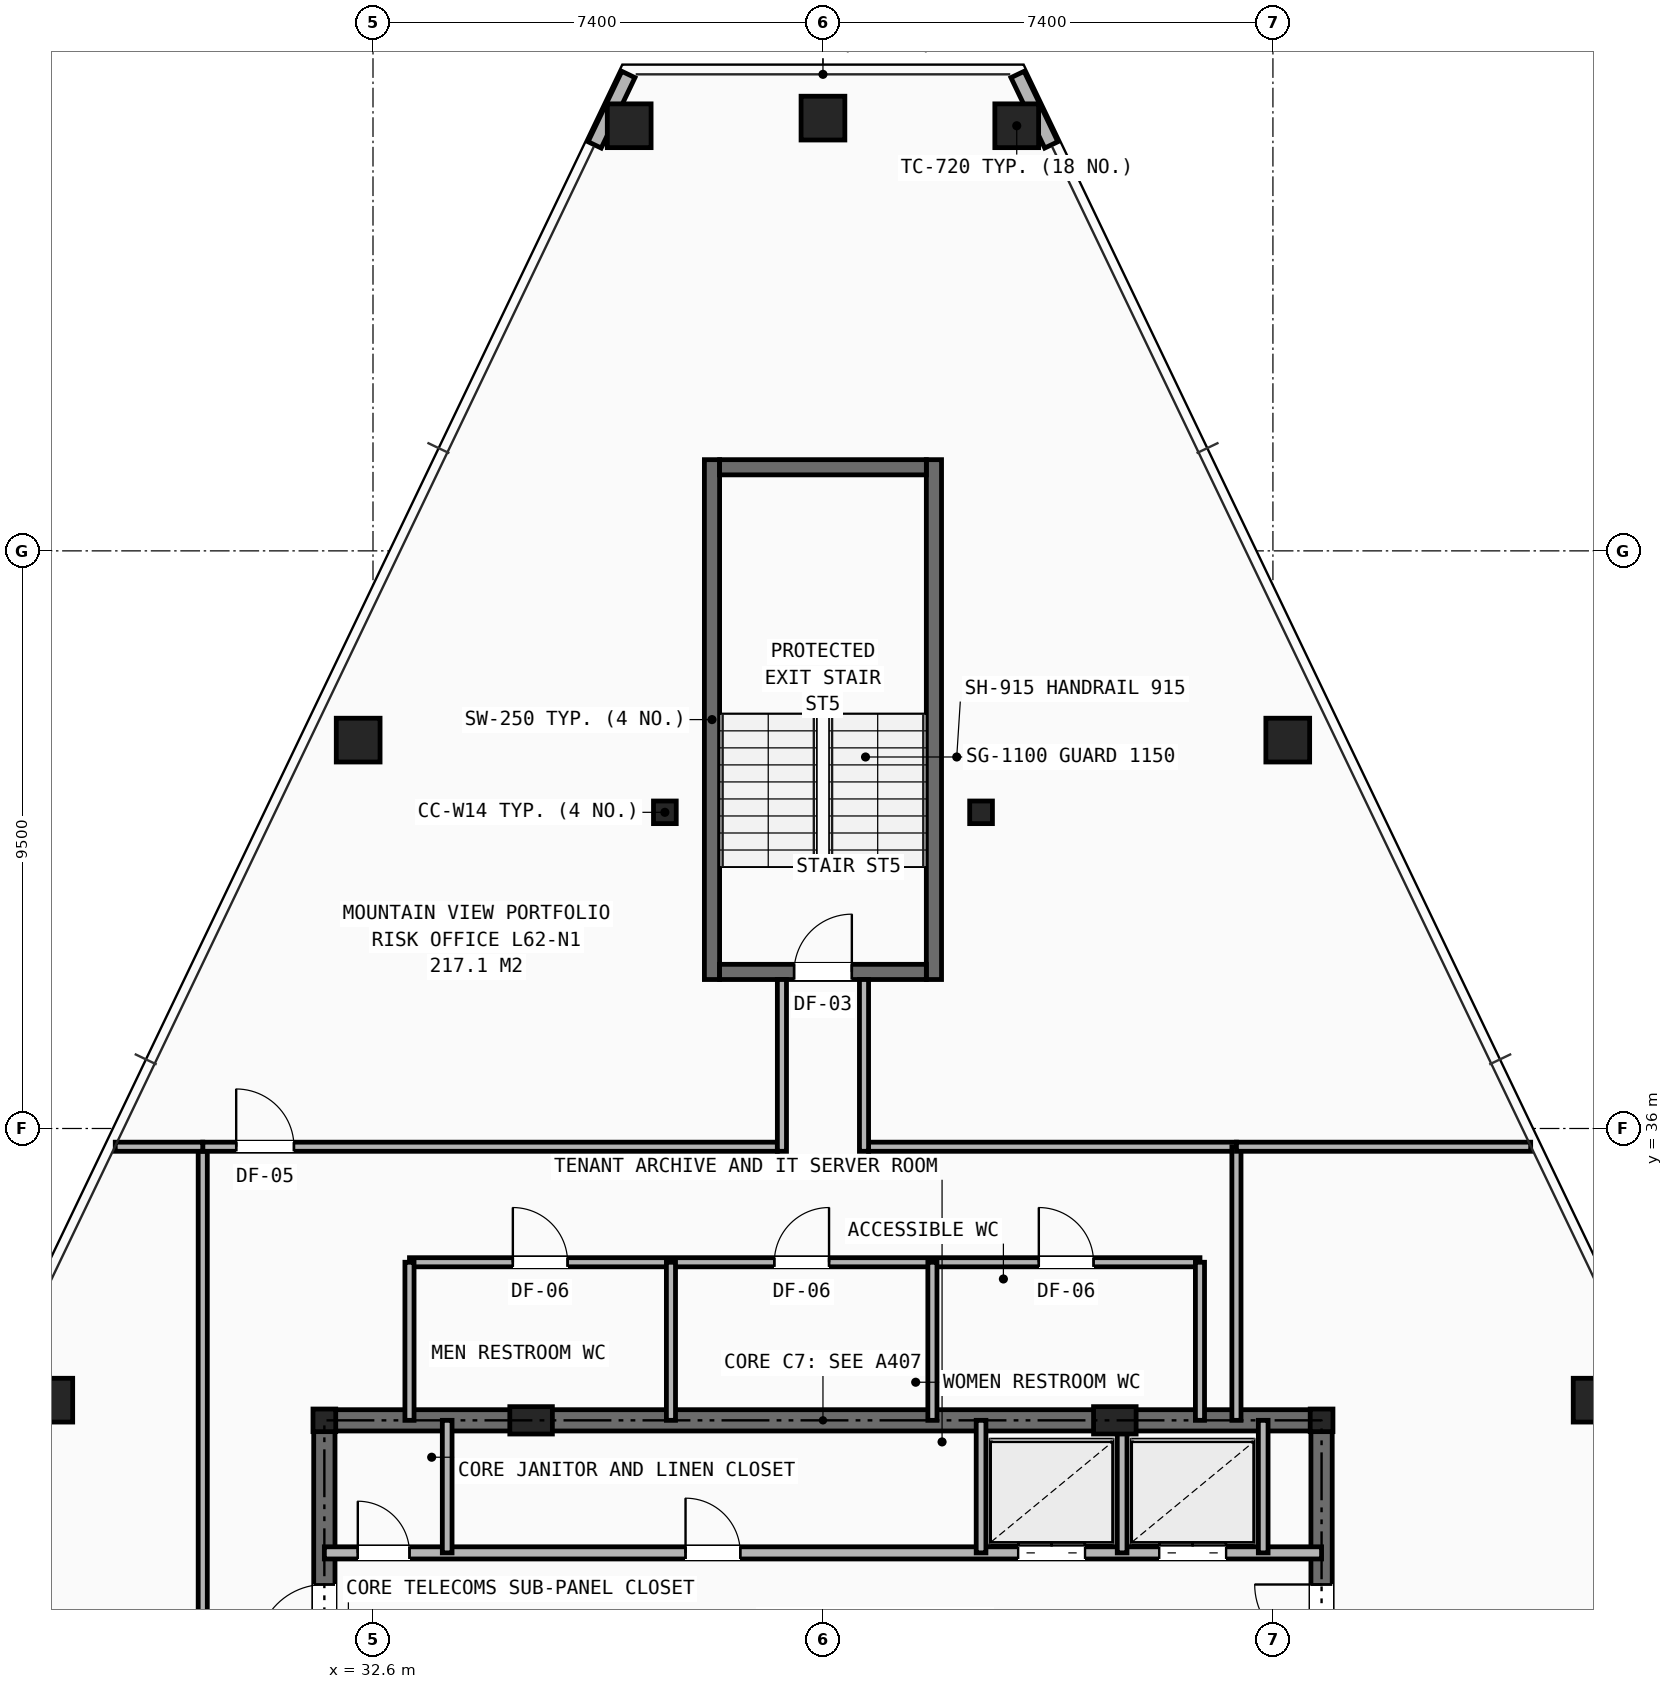
"""IFC4 building model, lengths in metres.
Left out: names, types, materials, properties, quantities, classifications, styles, units other than length and angle.
Written with IfcOpenShell. Run it as: python <this file> out.ifc"""

import sys

from ifc_helpers import new_model, si_unit, direction, frame, frame_2d, origin, origin_2d, place, context, subcontext, project, spatial, rectangle, hollow_rectangle, i_section, extrude, element, fill, save


model = new_model("IFC4")
c1 = context("Model", 3, precision=1e-05, world=origin(), true_north=direction((0.0, 1.0)))
c2 = subcontext(c1, "Body", "Model", "MODEL_VIEW")
j1 = project(units=[si_unit("LENGTHUNIT", "METRE"), si_unit("PLANEANGLEUNIT", "RADIAN")], contexts=[c1])
p1 = place(None, origin())
s1 = spatial("IfcSite", under=j1, at=p1, CompositionType="ELEMENT")
p2 = place(p1, origin())
s2 = spatial("IfcBuilding", under=s1, at=p2, CompositionType="ELEMENT")
p3 = place(p2, frame((0.0, 0.0, 218.9)))
s3 = spatial("IfcBuildingStorey", under=s2, at=p3, CompositionType="ELEMENT", Elevation=218.9)
for number, where, z_axis, x_axis in (
    (1, (31.8, 31.2, 0.0), (0.0, 0.0, 1.0), (1.0, 0.0, 0.0)),
    (2, (48.2, 31.2, 0.0), (0.0, 0.0, 1.0), (1.0, 0.0, 0.0)),
    (3, (37.4, 41.2, 0.0), (0.0, 0.0, 1.0), (1.0, 0.0, 0.0)),
    (4, (42.6, 41.2, 0.0), (0.0, 0.0, 1.0), (1.0, 0.0, 0.0)),
):
    element("IfcColumn", number, at=place(p3, frame(where, z_axis=z_axis, x_axis=x_axis)), inside=s3, PredefinedType="COLUMN", context=c2, shape_type="SweptSolid", body=[
        extrude(i_section(OverallWidth=0.374, OverallDepth=0.372, WebThickness=0.016, FlangeThickness=0.026, at=origin_2d()), origin(), (0.0, 0.0, 1.0), 3.5),
    ])
for number, where, z_axis, x_axis in (
    (5, (35.2, 31.2, 0.0), (0.0, 0.0, 1.0), (1.0, 0.0, 0.0)),
    (6, (44.8, 31.2, 0.0), (0.0, 0.0, 1.0), (1.0, 0.0, 0.0)),
):
    element("IfcColumn", number, at=place(p3, frame(where, z_axis=z_axis, x_axis=x_axis)), inside=s3, PredefinedType="PILASTER", context=c2, shape_type="SweptSolid", body=[
        extrude(rectangle(XDim=0.7, YDim=0.45, at=origin_2d()), origin(), (0.0, 0.0, 1.0), 3.5),
    ])
for number, where, z_axis, x_axis in (
    (7, (43.187, 52.492, 0.0), (0.0, 0.0, 1.0), (1.0, 0.0, 0.0)),
    (8, (40.0, 52.617, 0.0), (0.0, 0.0, 1.0), (1.0, 0.0, 0.0)),
    (9, (36.813, 52.492, 0.0), (0.0, 0.0, 1.0), (1.0, 0.0, 0.0)),
    (10, (32.356, 42.388, 0.0), (0.0, 0.0, 1.0), (1.0, 0.0, 0.0)),
    (11, (27.301, 31.532, 0.0), (0.0, 0.0, 1.0), (1.0, 0.0, 0.0)),
    (12, (52.699, 31.532, 0.0), (0.0, 0.0, 1.0), (1.0, 0.0, 0.0)),
    (13, (47.644, 42.388, 0.0), (0.0, 0.0, 1.0), (1.0, 0.0, 0.0)),
):
    element("IfcColumn", number, at=place(p3, frame(where, z_axis=z_axis, x_axis=x_axis)), inside=s3, PredefinedType="COLUMN", context=c2, shape_type="SweptSolid", body=[
        extrude(hollow_rectangle(XDim=0.72, YDim=0.72, WallThickness=0.05, at=origin_2d()), origin(), (0.0, 0.0, 1.0), 3.5),
    ])
for number, where, z_axis, x_axis in (
    (14, (36.8, 53.335, 0.0), (0.0, 0.0, 1.0), (-0.432, -0.902, 0.0)),
    (15, (43.755, 52.177, 0.0), (0.0, 0.0, 1.0), (-0.432, 0.902, 0.0)),
):
    element("IfcWall", number, at=place(p3, frame(where, z_axis=z_axis, x_axis=x_axis)), inside=s3, PredefinedType="SHEAR", context=c2, shape_type="SweptSolid", body=[
        extrude(rectangle(XDim=1.284, YDim=0.24, at=frame_2d((0.642, 0.0))), origin(), (0.0, 0.0, 1.0), 2.623),
    ])
p4 = place(p3, frame((31.8, 31.2, 0.0), z_axis=(0.0, 0.0, 1.0), x_axis=(1.0, 0.0, 0.0)))
e16 = element("IfcWall", 16, at=p4, inside=s3, PredefinedType="SHEAR", context=c2, shape_type="SweptSolid", body=[
    extrude(rectangle(XDim=16.4, YDim=0.35, at=frame_2d((8.2, 0.0))), origin(), (0.0, 0.0, 1.0), 3.25),
])
p5 = place(p3, frame((31.8, 16.4, 0.0), z_axis=(0.0, 0.0, 1.0), x_axis=(0.0, 1.0, 0.0)))
e17 = element("IfcWall", 17, at=p5, inside=s3, PredefinedType="SHEAR", context=c2, shape_type="SweptSolid", body=[
    extrude(rectangle(XDim=14.8, YDim=0.35, at=frame_2d((7.4, 0.0))), origin(), (0.0, 0.0, 1.0), 3.25),
])
p6 = place(p5, frame((11.0, 0.0, 0.0)))
e18 = element("IfcOpeningElement", 18, at=p6, cuts=e17, PredefinedType="OPENING", context=c2, shape_type="SweptSolid", body=[
    extrude(rectangle(XDim=1.1, YDim=2.15, at=frame_2d((0.55, 1.075))), frame((0.0, 0.185, 0.0), z_axis=(0.0, -1.0, 0.0), x_axis=(1.0, 0.0, 0.0)), (0.0, 0.0, 1.0), 0.37),
])
p7 = place(p3, frame((48.2, 16.4, 0.0), z_axis=(0.0, 0.0, 1.0), x_axis=(0.0, 1.0, 0.0)))
e19 = element("IfcWall", 19, at=p7, inside=s3, PredefinedType="SHEAR", context=c2, shape_type="SweptSolid", body=[
    extrude(rectangle(XDim=14.8, YDim=0.35, at=frame_2d((7.4, 0.0))), origin(), (0.0, 0.0, 1.0), 3.25),
])
p8 = place(p7, frame((11.0, 0.0, 0.0)))
e20 = element("IfcOpeningElement", 20, at=p8, cuts=e19, PredefinedType="OPENING", context=c2, shape_type="SweptSolid", body=[
    extrude(rectangle(XDim=1.1, YDim=2.15, at=frame_2d((0.55, 1.075))), frame((0.0, 0.185, 0.0), z_axis=(0.0, -1.0, 0.0), x_axis=(1.0, 0.0, 0.0)), (0.0, 0.0, 1.0), 0.37),
])
p9 = place(p3, frame((31.8, 29.02, 0.0), z_axis=(0.0, 0.0, 1.0), x_axis=(1.0, 0.0, 0.0)))
e21 = element("IfcWall", 21, at=p9, inside=s3, PredefinedType="SOLIDWALL", context=c2, shape_type="SweptSolid", body=[
    extrude(rectangle(XDim=16.4, YDim=0.2, at=frame_2d((8.2, 0.0))), origin(), (0.0, 0.0, 1.0), 2.705),
])
p10 = place(p9, frame((0.55, 0.0, 0.0)))
e22 = element("IfcOpeningElement", 22, at=p10, cuts=e21, PredefinedType="OPENING", context=c2, shape_type="SweptSolid", body=[
    extrude(rectangle(XDim=0.85, YDim=2.05, at=frame_2d((0.425, 1.025))), frame((0.0, 0.11, 0.0), z_axis=(0.0, -1.0, 0.0), x_axis=(1.0, 0.0, 0.0)), (0.0, 0.0, 1.0), 0.22),
])
p11 = place(p9, frame((5.94, 0.0, 0.0)))
e23 = element("IfcOpeningElement", 23, at=p11, cuts=e21, PredefinedType="OPENING", context=c2, shape_type="SweptSolid", body=[
    extrude(rectangle(XDim=0.9, YDim=2.1, at=frame_2d((0.45, 1.05))), frame((0.0, 0.11, 0.0), z_axis=(0.0, -1.0, 0.0), x_axis=(1.0, 0.0, 0.0)), (0.0, 0.0, 1.0), 0.22),
])
p12 = place(p9, frame((11.41, 0.0, 0.0)))
e24 = element("IfcOpeningElement", 24, at=p12, cuts=e21, PredefinedType="OPENING", context=c2, shape_type="SweptSolid", body=[
    extrude(rectangle(XDim=1.1, YDim=2.15, at=frame_2d((0.55, 1.075))), frame((0.0, 0.11, 0.0), z_axis=(0.0, -1.0, 0.0), x_axis=(1.0, 0.0, 0.0)), (0.0, 0.0, 1.0), 0.22),
])
p13 = place(p9, frame((13.73, 0.0, 0.0)))
e25 = element("IfcOpeningElement", 25, at=p13, cuts=e21, PredefinedType="OPENING", context=c2, shape_type="SweptSolid", body=[
    extrude(rectangle(XDim=1.1, YDim=2.15, at=frame_2d((0.55, 1.075))), frame((0.0, 0.11, 0.0), z_axis=(0.0, -1.0, 0.0), x_axis=(1.0, 0.0, 0.0)), (0.0, 0.0, 1.0), 0.22),
])
for number, where, z_axis, x_axis in (
    (26, (33.82, 29.02, 0.0), (0.0, 0.0, 1.0), (0.0, 1.0, 0.0)),
    (27, (42.6, 29.02, 0.0), (0.0, 0.0, 1.0), (0.0, 1.0, 0.0)),
    (28, (44.92, 29.02, 0.0), (0.0, 0.0, 1.0), (0.0, 1.0, 0.0)),
    (29, (47.24, 29.02, 0.0), (0.0, 0.0, 1.0), (0.0, 1.0, 0.0)),
):
    element("IfcWall", number, at=place(p3, frame(where, z_axis=z_axis, x_axis=x_axis)), inside=s3, PredefinedType="SOLIDWALL", context=c2, shape_type="SweptSolid", body=[
        extrude(rectangle(XDim=2.18, YDim=0.16, at=frame_2d((1.09, 0.0))), origin(), (0.0, 0.0, 1.0), 2.705),
    ])
p14 = place(p3, frame((33.2, 33.8, 0.0), z_axis=(0.0, 0.0, 1.0), x_axis=(1.0, 0.0, 0.0)))
e30 = element("IfcWall", 30, at=p14, inside=s3, PredefinedType="PARTITIONING", context=c2, shape_type="SweptSolid", body=[
    extrude(rectangle(XDim=13.0, YDim=0.15, at=frame_2d((6.5, 0.0))), origin(), (0.0, 0.0, 1.0), 3.25),
])
p15 = place(p14, frame((1.7, 0.0, 0.0)))
e31 = element("IfcOpeningElement", 31, at=p15, cuts=e30, PredefinedType="OPENING", context=c2, shape_type="SweptSolid", body=[
    extrude(rectangle(XDim=0.9, YDim=2.1, at=frame_2d((0.45, 1.05))), frame((0.0, 0.085, 0.0), z_axis=(0.0, -1.0, 0.0), x_axis=(1.0, 0.0, 0.0)), (0.0, 0.0, 1.0), 0.17),
])
p16 = place(p14, frame((6.0, 0.0, 0.0)))
e32 = element("IfcOpeningElement", 32, at=p16, cuts=e30, PredefinedType="OPENING", context=c2, shape_type="SweptSolid", body=[
    extrude(rectangle(XDim=0.9, YDim=2.1, at=frame_2d((0.45, 1.05))), frame((0.0, 0.085, 0.0), z_axis=(0.0, -1.0, 0.0), x_axis=(1.0, 0.0, 0.0)), (0.0, 0.0, 1.0), 0.17),
])
p17 = place(p14, frame((10.35, 0.0, 0.0)))
e33 = element("IfcOpeningElement", 33, at=p17, cuts=e30, PredefinedType="OPENING", context=c2, shape_type="SweptSolid", body=[
    extrude(rectangle(XDim=0.9, YDim=2.1, at=frame_2d((0.45, 1.05))), frame((0.0, 0.085, 0.0), z_axis=(0.0, -1.0, 0.0), x_axis=(1.0, 0.0, 0.0)), (0.0, 0.0, 1.0), 0.17),
])
for number, where, z_axis, x_axis in (
    (34, (33.2, 31.2, 0.0), (0.0, 0.0, 1.0), (0.0, 1.0, 0.0)),
    (35, (46.2, 31.2, 0.0), (0.0, 0.0, 1.0), (0.0, 1.0, 0.0)),
    (36, (37.5, 31.2, 0.0), (0.0, 0.0, 1.0), (0.0, 1.0, 0.0)),
    (37, (41.8, 31.2, 0.0), (0.0, 0.0, 1.0), (0.0, 1.0, 0.0)),
):
    element("IfcWall", number, at=place(p3, frame(where, z_axis=z_axis, x_axis=x_axis)), inside=s3, PredefinedType="PARTITIONING", context=c2, shape_type="SweptSolid", body=[
        extrude(rectangle(XDim=2.6, YDim=0.15, at=frame_2d((1.3, 0.0))), origin(), (0.0, 0.0, 1.0), 2.705),
    ])
p18 = place(p3, frame((29.8, 16.4, 0.0), z_axis=(0.0, 0.0, 1.0), x_axis=(0.0, 1.0, 0.0)))
e38 = element("IfcWall", 38, at=p18, inside=s3, PredefinedType="PARTITIONING", context=c2, shape_type="SweptSolid", body=[
    extrude(rectangle(XDim=19.3, YDim=0.15, at=frame_2d((9.65, 0.0))), origin(), (0.0, 0.0, 1.0), 2.292),
])
p19 = place(p18, frame((0.35, 0.0, 0.0)))
e39 = element("IfcOpeningElement", 39, at=p19, cuts=e38, PredefinedType="OPENING", context=c2, shape_type="SweptSolid", body=[
    extrude(rectangle(XDim=0.95, YDim=2.1, at=frame_2d((0.475, 1.05))), frame((0.0, 0.085, 0.0), z_axis=(0.0, -1.0, 0.0), x_axis=(1.0, 0.0, 0.0)), (0.0, 0.0, 1.0), 0.17),
])
p20 = place(p18, frame((10.45, 0.0, 0.0)))
e40 = element("IfcOpeningElement", 40, at=p20, cuts=e38, PredefinedType="OPENING", context=c2, shape_type="SweptSolid", body=[
    extrude(rectangle(XDim=0.95, YDim=2.1, at=frame_2d((0.475, 1.05))), frame((0.0, 0.085, 0.0), z_axis=(0.0, -1.0, 0.0), x_axis=(1.0, 0.0, 0.0)), (0.0, 0.0, 1.0), 0.17),
])
p21 = place(p3, frame((29.8, 35.7, 0.0), z_axis=(0.0, 0.0, 1.0), x_axis=(1.0, 0.0, 0.0)))
e41 = element("IfcWall", 41, at=p21, inside=s3, PredefinedType="PARTITIONING", context=c2, shape_type="SweptSolid", body=[
    extrude(rectangle(XDim=9.45, YDim=0.15, at=frame_2d((4.725, 0.0))), origin(), (0.0, 0.0, 1.0), 2.833),
])
p22 = place(p21, frame((0.55, 0.0, 0.0)))
e42 = element("IfcOpeningElement", 42, at=p22, cuts=e41, PredefinedType="OPENING", context=c2, shape_type="SweptSolid", body=[
    extrude(rectangle(XDim=0.95, YDim=2.1, at=frame_2d((0.475, 1.05))), frame((0.0, 0.085, 0.0), z_axis=(0.0, -1.0, 0.0), x_axis=(1.0, 0.0, 0.0)), (0.0, 0.0, 1.0), 0.17),
])
p23 = place(p3, frame((40.75, 35.7, 0.0), z_axis=(0.0, 0.0, 1.0), x_axis=(1.0, 0.0, 0.0)))
e43 = element("IfcWall", 43, at=p23, inside=s3, PredefinedType="PARTITIONING", context=c2, shape_type="SweptSolid", body=[
    extrude(rectangle(XDim=6.05, YDim=0.15, at=frame_2d((3.025, 0.0))), origin(), (0.0, 0.0, 1.0), 3.25),
])
p24 = place(p3, frame((46.8, 31.2, 0.0), z_axis=(0.0, 0.0, 1.0), x_axis=(0.0, 1.0, 0.0)))
e44 = element("IfcWall", 44, at=p24, inside=s3, PredefinedType="PARTITIONING", context=c2, shape_type="SweptSolid", body=[
    extrude(rectangle(XDim=4.5, YDim=0.15, at=frame_2d((2.25, 0.0))), origin(), (0.0, 0.0, 1.0), 2.705),
])
p25 = place(p3, frame((28.361, 35.7, 0.0), z_axis=(0.0, 0.0, 1.0), x_axis=(1.0, 0.0, 0.0)))
e45 = element("IfcWall", 45, at=p25, inside=s3, PredefinedType="PARTITIONING", context=c2, shape_type="SweptSolid", body=[
    extrude(rectangle(XDim=1.439, YDim=0.15, at=frame_2d((0.719, 0.0))), origin(), (0.0, 0.0, 1.0), 2.628),
])
p26 = place(p3, frame((46.8, 35.7, 0.0), z_axis=(0.0, 0.0, 1.0), x_axis=(1.0, 0.0, 0.0)))
e46 = element("IfcWall", 46, at=p26, inside=s3, PredefinedType="PARTITIONING", context=c2, shape_type="SweptSolid", body=[
    extrude(rectangle(XDim=4.839, YDim=0.15, at=frame_2d((2.419, 0.0))), origin(), (0.0, 0.0, 1.0), 2.628),
])
for number, where, z_axis, x_axis in (
    (47, (38.175, 38.45, 0.0), (0.0, 0.0, 1.0), (0.0, 1.0, 0.0)),
    (48, (41.825, 38.45, 0.0), (0.0, 0.0, 1.0), (0.0, 1.0, 0.0)),
):
    element("IfcWall", number, at=place(p3, frame(where, z_axis=z_axis, x_axis=x_axis)), inside=s3, PredefinedType="SHEAR", context=c2, shape_type="SweptSolid", body=[
        extrude(rectangle(XDim=8.55, YDim=0.25, at=frame_2d((4.275, 0.0))), origin(), (0.0, 0.0, 1.0), 3.25),
    ])
p27 = place(p3, frame((38.3, 38.575, 0.0), z_axis=(0.0, 0.0, 1.0), x_axis=(1.0, 0.0, 0.0)))
e49 = element("IfcWall", 49, at=p27, inside=s3, PredefinedType="SHEAR", context=c2, shape_type="SweptSolid", body=[
    extrude(rectangle(XDim=3.4, YDim=0.25, at=frame_2d((1.7, 0.0))), origin(), (0.0, 0.0, 1.0), 3.25),
])
p28 = place(p27, frame((1.225, 0.0, 0.0)))
e50 = element("IfcOpeningElement", 50, at=p28, cuts=e49, PredefinedType="OPENING", context=c2, shape_type="SweptSolid", body=[
    extrude(rectangle(XDim=0.95, YDim=2.1, at=frame_2d((0.475, 1.05))), frame((0.0, 0.135, 0.0), z_axis=(0.0, -1.0, 0.0), x_axis=(1.0, 0.0, 0.0)), (0.0, 0.0, 1.0), 0.27),
])
p29 = place(p3, frame((38.3, 46.875, 0.0), z_axis=(0.0, 0.0, 1.0), x_axis=(1.0, 0.0, 0.0)))
e51 = element("IfcWall", 51, at=p29, inside=s3, PredefinedType="SHEAR", context=c2, shape_type="SweptSolid", body=[
    extrude(rectangle(XDim=3.4, YDim=0.25, at=frame_2d((1.7, 0.0))), origin(), (0.0, 0.0, 1.0), 3.25),
])
for number, where, z_axis, x_axis in (
    (52, (39.325, 35.625, 0.0), (0.0, 0.0, 1.0), (0.0, 1.0, 0.0)),
    (53, (40.675, 35.625, 0.0), (0.0, 0.0, 1.0), (0.0, 1.0, 0.0)),
):
    element("IfcWall", number, at=place(p3, frame(where, z_axis=z_axis, x_axis=x_axis)), inside=s3, PredefinedType="PARTITIONING", context=c2, shape_type="SweptSolid", body=[
        extrude(rectangle(XDim=2.825, YDim=0.15, at=frame_2d((1.413, 0.0))), origin(), (0.0, 0.0, 1.0), 3.25),
    ])
p30 = place(p10, origin())
e54 = element("IfcDoor", 54, at=p30, inside=s3, OperationType="SINGLE_SWING_LEFT", PredefinedType="DOOR", context=c2, shape_type="SweptSolid", body=[
    extrude(rectangle(XDim=0.85, YDim=2.05, at=frame_2d((0.425, 1.025))), frame((0.0, 0.025, 0.0), z_axis=(0.0, -1.0, 0.0), x_axis=(1.0, 0.0, 0.0)), (0.0, 0.0, 1.0), 0.05),
])
fill(e22, e54)
p31 = place(p6, origin())
e55 = element("IfcDoor", 55, at=p31, inside=s3, OperationType="SINGLE_SWING_LEFT", PredefinedType="DOOR", context=c2, shape_type="SweptSolid", body=[
    extrude(rectangle(XDim=1.1, YDim=2.15, at=frame_2d((0.55, 1.075))), frame((0.0, 0.025, 0.0), z_axis=(0.0, -1.0, 0.0), x_axis=(1.0, 0.0, 0.0)), (0.0, 0.0, 1.0), 0.05),
])
fill(e18, e55)
p32 = place(p8, origin())
e56 = element("IfcDoor", 56, at=p32, inside=s3, OperationType="SINGLE_SWING_RIGHT", PredefinedType="DOOR", context=c2, shape_type="SweptSolid", body=[
    extrude(rectangle(XDim=1.1, YDim=2.15, at=frame_2d((0.55, 1.075))), frame((0.0, 0.025, 0.0), z_axis=(0.0, -1.0, 0.0), x_axis=(1.0, 0.0, 0.0)), (0.0, 0.0, 1.0), 0.05),
])
fill(e20, e56)
p33 = place(p11, origin())
e57 = element("IfcDoor", 57, at=p33, inside=s3, OperationType="SINGLE_SWING_LEFT", PredefinedType="DOOR", context=c2, shape_type="SweptSolid", body=[
    extrude(rectangle(XDim=0.9, YDim=2.1, at=frame_2d((0.45, 1.05))), frame((0.0, 0.025, 0.0), z_axis=(0.0, -1.0, 0.0), x_axis=(1.0, 0.0, 0.0)), (0.0, 0.0, 1.0), 0.05),
])
fill(e23, e57)
p34 = place(p12, origin())
e58 = element("IfcDoor", 58, at=p34, inside=s3, OperationType="DOUBLE_DOOR_SLIDING", PredefinedType="DOOR", context=c2, shape_type="SweptSolid", body=[
    extrude(rectangle(XDim=1.1, YDim=2.15, at=frame_2d((0.55, 1.075))), frame((0.0, 0.025, 0.0), z_axis=(0.0, -1.0, 0.0), x_axis=(1.0, 0.0, 0.0)), (0.0, 0.0, 1.0), 0.05),
])
fill(e24, e58)
p35 = place(p13, origin())
e59 = element("IfcDoor", 59, at=p35, inside=s3, OperationType="DOUBLE_DOOR_SLIDING", PredefinedType="DOOR", context=c2, shape_type="SweptSolid", body=[
    extrude(rectangle(XDim=1.1, YDim=2.15, at=frame_2d((0.55, 1.075))), frame((0.0, 0.025, 0.0), z_axis=(0.0, -1.0, 0.0), x_axis=(1.0, 0.0, 0.0)), (0.0, 0.0, 1.0), 0.05),
])
fill(e25, e59)
p36 = place(p15, origin())
e60 = element("IfcDoor", 60, at=p36, inside=s3, OperationType="SINGLE_SWING_LEFT", PredefinedType="DOOR", context=c2, shape_type="SweptSolid", body=[
    extrude(rectangle(XDim=0.9, YDim=2.1, at=frame_2d((0.45, 1.05))), frame((0.0, 0.025, 0.0), z_axis=(0.0, -1.0, 0.0), x_axis=(1.0, 0.0, 0.0)), (0.0, 0.0, 1.0), 0.05),
])
fill(e31, e60)
p37 = place(p16, origin())
e61 = element("IfcDoor", 61, at=p37, inside=s3, OperationType="SINGLE_SWING_RIGHT", PredefinedType="DOOR", context=c2, shape_type="SweptSolid", body=[
    extrude(rectangle(XDim=0.9, YDim=2.1, at=frame_2d((0.45, 1.05))), frame((0.0, 0.025, 0.0), z_axis=(0.0, -1.0, 0.0), x_axis=(1.0, 0.0, 0.0)), (0.0, 0.0, 1.0), 0.05),
])
fill(e32, e61)
p38 = place(p17, origin())
e62 = element("IfcDoor", 62, at=p38, inside=s3, OperationType="SINGLE_SWING_LEFT", PredefinedType="DOOR", context=c2, shape_type="SweptSolid", body=[
    extrude(rectangle(XDim=0.9, YDim=2.1, at=frame_2d((0.45, 1.05))), frame((0.0, 0.025, 0.0), z_axis=(0.0, -1.0, 0.0), x_axis=(1.0, 0.0, 0.0)), (0.0, 0.0, 1.0), 0.05),
])
fill(e33, e62)
p39 = place(p22, origin())
e63 = element("IfcDoor", 63, at=p39, inside=s3, OperationType="SINGLE_SWING_LEFT", PredefinedType="DOOR", context=c2, shape_type="SweptSolid", body=[
    extrude(rectangle(XDim=0.95, YDim=2.1, at=frame_2d((0.475, 1.05))), frame((0.0, 0.025, 0.0), z_axis=(0.0, -1.0, 0.0), x_axis=(1.0, 0.0, 0.0)), (0.0, 0.0, 1.0), 0.05),
])
fill(e42, e63)
p40 = place(p28, origin())
e64 = element("IfcDoor", 64, at=p40, inside=s3, OperationType="SINGLE_SWING_RIGHT", PredefinedType="DOOR", context=c2, shape_type="SweptSolid", body=[
    extrude(rectangle(XDim=0.95, YDim=2.1, at=frame_2d((0.475, 1.05))), frame((0.0, 0.025, 0.0), z_axis=(0.0, -1.0, 0.0), x_axis=(1.0, 0.0, 0.0)), (0.0, 0.0, 1.0), 0.05),
])
fill(e50, e64)
save(model, sys.argv[1])
